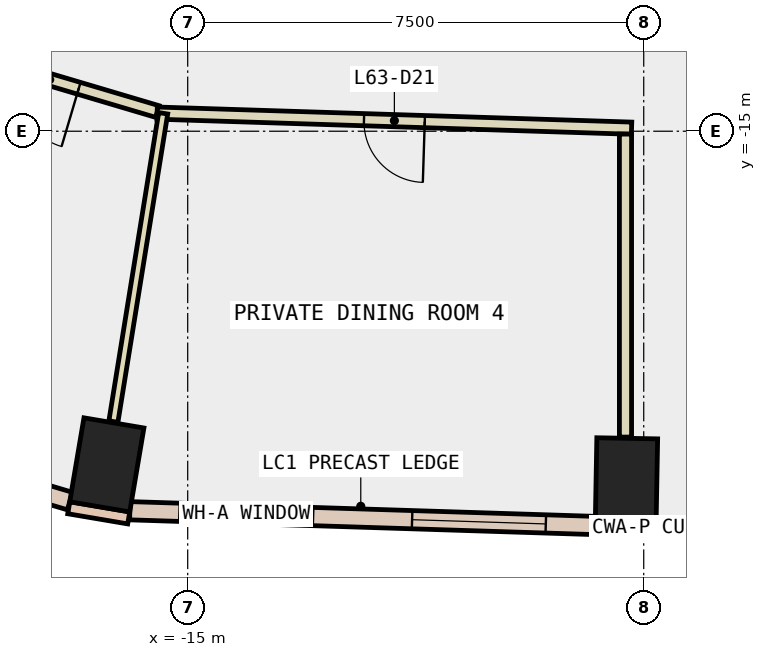
"""IFC4 building model, lengths in metres.
Left out: names, types, materials, properties, quantities, classifications, styles, units other than length and angle.
Written with IfcOpenShell. Run it as: python <this file> out.ifc"""

import sys

from ifc_helpers import new_model, si_unit, direction, frame, frame_2d, origin, origin_2d, place, context, subcontext, project, spatial, rectangle, extrude, element, fill, save


model = new_model("IFC4")
c1 = context("Model", 3, precision=1e-05, world=origin(), true_north=direction((0.0, 1.0)))
c2 = subcontext(c1, "Body", "Model", "MODEL_VIEW")
j1 = project(units=[si_unit("LENGTHUNIT", "METRE"), si_unit("PLANEANGLEUNIT", "RADIAN")], contexts=[c1])
p1 = place(None, origin())
s1 = spatial("IfcSite", under=j1, at=p1, CompositionType="ELEMENT")
p2 = place(p1, origin())
s2 = spatial("IfcBuilding", under=s1, at=p2, CompositionType="ELEMENT")
p3 = place(p2, frame((0.0, 0.0, 273.8)))
s3 = spatial("IfcBuildingStorey", under=s2, at=p3, CompositionType="ELEMENT", Elevation=273.8)
for number, where, z_axis, x_axis in (
    (1, (-16.33, -20.487, -0.34), (0.0, 0.0, 1.0), (-0.986, 0.167, 0.0)),
    (2, (-7.784, -20.75, -0.34), (0.0, 0.0, 1.0), (-1.0, 0.018, 0.0)),
):
    element("IfcColumn", number, at=place(p3, frame(where, z_axis=z_axis, x_axis=x_axis)), inside=s3, PredefinedType="COLUMN", context=c2, shape_type="SweptSolid", body=[
        extrude(rectangle(XDim=1.0, YDim=1.4, at=origin_2d()), origin(), (0.0, 0.0, 1.0), 3.6),
    ])
for number, where, z_axis, x_axis in (
    (3, (-16.956, -21.192, 0.0), (0.0, 0.0, 1.0), (0.986, -0.167, 0.0)),
    (4, (-8.298, -21.541, 0.0), (0.0, 0.0, 1.0), (1.0, -0.018, 0.0)),
):
    element("IfcWall", number, at=place(p3, frame(where, z_axis=z_axis, x_axis=x_axis)), inside=s3, PredefinedType="STANDARD", context=c2, shape_type="SweptSolid", body=[
        extrude(rectangle(XDim=1.0, YDim=0.2, at=frame_2d((0.5, 0.0))), origin(), (0.0, 0.0, 1.0), 3.26),
    ])
p4 = place(p3, frame((-15.951, -21.241, 0.0), z_axis=(0.0, 0.0, 1.0), x_axis=(0.999496876383, -0.031717410046, 0.0)))
e5 = element("IfcWall", 5, at=p4, inside=s3, PredefinedType="STANDARD", context=c2, shape_type="SweptSolid", body=[
    extrude(rectangle(XDim=7.659, YDim=0.3, at=frame_2d((3.83, 0.0))), origin(), (0.0, 0.0, 1.0), 3.26),
])
p5 = place(p4, frame((0.815, 0.0, 0.9)))
e6 = element("IfcOpeningElement", 6, at=p5, cuts=e5, PredefinedType="OPENING", context=c2, shape_type="SweptSolid", body=[
    extrude(rectangle(XDim=2.2, YDim=2.0, at=frame_2d((1.1, 1.0))), frame((0.0, 0.16, 0.0), z_axis=(0.0, -1.0, 0.0), x_axis=(1.0, 0.0, 0.0)), (0.0, 0.0, 1.0), 0.32),
])
p6 = place(p4, frame((4.644, 0.0, 0.9)))
e7 = element("IfcOpeningElement", 7, at=p6, cuts=e5, PredefinedType="OPENING", context=c2, shape_type="SweptSolid", body=[
    extrude(rectangle(XDim=2.2, YDim=2.0, at=frame_2d((1.1, 1.0))), frame((0.0, 0.16, 0.0), z_axis=(0.0, -1.0, 0.0), x_axis=(1.0, 0.0, 0.0)), (0.0, 0.0, 1.0), 0.32),
])
p7 = place(p3, frame((-21.764, -19.649, 0.0), z_axis=(0.0, 0.0, 1.0), x_axis=(0.95864045837, -0.284619872067, 0.0)))
e8 = element("IfcWall", 8, at=p7, inside=s3, PredefinedType="STANDARD", context=c2, shape_type="SweptSolid", body=[
    extrude(rectangle(XDim=5.035, YDim=0.3, at=frame_2d((2.518, 0.0))), origin(), (0.0, 0.0, 1.0), 3.26),
])
p8 = place(p7, frame((0.559, 0.0, 0.9)))
e9 = element("IfcOpeningElement", 9, at=p8, cuts=e8, PredefinedType="OPENING", context=c2, shape_type="SweptSolid", body=[
    extrude(rectangle(XDim=1.4, YDim=2.0, at=frame_2d((0.7, 1.0))), frame((0.0, 0.16, 0.0), z_axis=(0.0, -1.0, 0.0), x_axis=(1.0, 0.0, 0.0)), (0.0, 0.0, 1.0), 0.32),
])
p9 = place(p7, frame((3.076, 0.0, 0.9)))
e10 = element("IfcOpeningElement", 10, at=p9, cuts=e8, PredefinedType="OPENING", context=c2, shape_type="SweptSolid", body=[
    extrude(rectangle(XDim=1.4, YDim=2.0, at=frame_2d((0.7, 1.0))), frame((0.0, 0.16, 0.0), z_axis=(0.0, -1.0, 0.0), x_axis=(1.0, 0.0, 0.0)), (0.0, 0.0, 1.0), 0.32),
])
p10 = place(p3, frame((-15.499, -14.676, 0.0), z_axis=(0.0, 0.0, 1.0), x_axis=(-0.958734738219, 0.284302131073, 0.0)))
e11 = element("IfcWall", 11, at=p10, inside=s3, PredefinedType="PARTITIONING", context=c2, shape_type="SweptSolid", body=[
    extrude(rectangle(XDim=3.693, YDim=0.2, at=frame_2d((1.847, 0.0))), origin(), (0.0, 0.0, 1.0), 3.26),
])
p11 = place(p10, frame((1.347, 0.0, 0.0)))
e12 = element("IfcOpeningElement", 12, at=p11, cuts=e11, PredefinedType="OPENING", context=c2, shape_type="SweptSolid", body=[
    extrude(rectangle(XDim=1.0, YDim=2.1, at=frame_2d((0.5, 1.05))), frame((0.0, 0.11, 0.0), z_axis=(0.0, -1.0, 0.0), x_axis=(1.0, 0.0, 0.0)), (0.0, 0.0, 1.0), 0.22),
])
p12 = place(p3, frame((-7.7, -14.95, 0.0), z_axis=(0.0, 0.0, 1.0), x_axis=(-0.999495120537, 0.031772693047, 0.0)))
e13 = element("IfcWall", 13, at=p12, inside=s3, PredefinedType="PARTITIONING", context=c2, shape_type="SweptSolid", body=[
    extrude(rectangle(XDim=7.807, YDim=0.2, at=frame_2d((3.903, 0.0))), origin(), (0.0, 0.0, 1.0), 3.26),
])
p13 = place(p12, frame((3.403, 0.0, 0.0)))
e14 = element("IfcOpeningElement", 14, at=p13, cuts=e13, PredefinedType="OPENING", context=c2, shape_type="SweptSolid", body=[
    extrude(rectangle(XDim=1.0, YDim=2.1, at=frame_2d((0.5, 1.05))), frame((0.0, 0.11, 0.0), z_axis=(0.0, -1.0, 0.0), x_axis=(1.0, 0.0, 0.0)), (0.0, 0.0, 1.0), 0.22),
])
p14 = place(p3, frame((-7.8, -20.03, 0.0), z_axis=(0.0, 0.0, 1.0), x_axis=(0.0, 1.0, 0.0)))
e15 = element("IfcWall", 15, at=p14, inside=s3, PredefinedType="PARTITIONING", context=c2, shape_type="SweptSolid", body=[
    extrude(rectangle(XDim=4.983, YDim=0.2, at=frame_2d((2.491, 0.0))), origin(), (0.0, 0.0, 1.0), 3.26),
])
p15 = place(p3, frame((-15.403, -14.705, 0.0), z_axis=(0.0, 0.0, 1.0), x_axis=(-0.159447664828, -0.98720638277, 0.0)))
e16 = element("IfcWall", 16, at=p15, inside=s3, PredefinedType="PARTITIONING", context=c2, shape_type="SweptSolid", body=[
    extrude(rectangle(XDim=5.135, YDim=0.15, at=frame_2d((2.568, 0.0))), origin(), (0.0, 0.0, 1.0), 3.26),
])
p16 = place(p5, origin())
e17 = element("IfcWindow", 17, at=p16, inside=s3, PartitioningType="SINGLE_PANEL", PredefinedType="WINDOW", context=c2, shape_type="SweptSolid", body=[
    extrude(rectangle(XDim=2.2, YDim=2.0, at=frame_2d((1.1, 1.0))), frame((0.0, 0.03, 0.0), z_axis=(0.0, -1.0, 0.0), x_axis=(1.0, 0.0, 0.0)), (0.0, 0.0, 1.0), 0.06),
])
fill(e6, e17)
p17 = place(p6, origin())
e18 = element("IfcWindow", 18, at=p17, inside=s3, PartitioningType="SINGLE_PANEL", PredefinedType="WINDOW", context=c2, shape_type="SweptSolid", body=[
    extrude(rectangle(XDim=2.2, YDim=2.0, at=frame_2d((1.1, 1.0))), frame((0.0, 0.03, 0.0), z_axis=(0.0, -1.0, 0.0), x_axis=(1.0, 0.0, 0.0)), (0.0, 0.0, 1.0), 0.06),
])
fill(e7, e18)
p18 = place(p11, origin())
e19 = element("IfcDoor", 19, at=p18, inside=s3, OperationType="SINGLE_SWING_LEFT", PredefinedType="DOOR", context=c2, shape_type="SweptSolid", body=[
    extrude(rectangle(XDim=1.0, YDim=2.1, at=frame_2d((0.5, 1.05))), frame((0.0, 0.025, 0.0), z_axis=(0.0, -1.0, 0.0), x_axis=(1.0, 0.0, 0.0)), (0.0, 0.0, 1.0), 0.05),
])
fill(e12, e19)
p19 = place(p13, origin())
e20 = element("IfcDoor", 20, at=p19, inside=s3, OperationType="SINGLE_SWING_LEFT", PredefinedType="DOOR", context=c2, shape_type="SweptSolid", body=[
    extrude(rectangle(XDim=1.0, YDim=2.1, at=frame_2d((0.5, 1.05))), frame((0.0, 0.025, 0.0), z_axis=(0.0, -1.0, 0.0), x_axis=(1.0, 0.0, 0.0)), (0.0, 0.0, 1.0), 0.05),
])
fill(e14, e20)
save(model, sys.argv[1])
